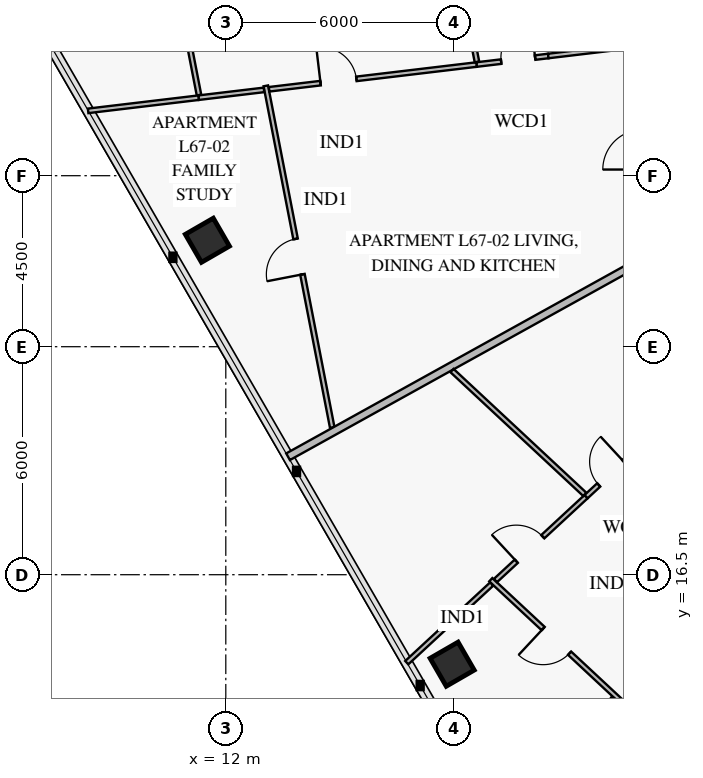
"""IFC4 building model, lengths in metres.
Left out: names, types, materials, properties, quantities, classifications, styles, units other than length and angle.
Written with IfcOpenShell. Run it as: python <this file> out.ifc"""

import sys

from ifc_helpers import new_model, si_unit, direction, frame, frame_2d, origin, origin_2d, place, context, subcontext, project, spatial, rectangle, extrude, element, fill, save


model = new_model("IFC4")
c1 = context("Model", 3, precision=1e-05, world=origin(), true_north=direction((0.0, 1.0)))
c2 = subcontext(c1, "Body", "Model", "MODEL_VIEW")
j1 = project(units=[si_unit("LENGTHUNIT", "METRE"), si_unit("PLANEANGLEUNIT", "RADIAN")], contexts=[c1])
p1 = place(None, origin())
s1 = spatial("IfcSite", under=j1, at=p1, CompositionType="ELEMENT")
p2 = place(p1, origin())
s2 = spatial("IfcBuilding", under=s1, at=p2, CompositionType="ELEMENT")
p3 = place(p2, frame((0.0, 0.0, 265.4)))
s3 = spatial("IfcBuildingStorey", under=s2, at=p3, CompositionType="ELEMENT", Elevation=265.4)
for number, where, z_axis, x_axis in (
    (1, (11.515, 25.301, 0.0), (0.0, 0.0, 1.0), (0.5, -0.866, 0.0)),
    (2, (17.956, 14.145, 0.0), (0.0, 0.0, 1.0), (0.5, -0.866, 0.0)),
):
    element("IfcColumn", number, at=place(p3, frame(where, z_axis=z_axis, x_axis=x_axis)), inside=s3, PredefinedType="COLUMN", context=c2, shape_type="SweptSolid", body=[
        extrude(rectangle(XDim=0.85, YDim=0.85, at=origin_2d()), origin(), (0.0, 0.0, 1.0), 3.55),
    ])
p4 = place(p3, frame((13.053, 29.365, 0.0), z_axis=(0.0, 0.0, 1.0), x_axis=(0.190811857209, -0.981626627159, 0.0)))
e3 = element("IfcWall", 3, at=p4, inside=s3, PredefinedType="PARTITIONING", context=c2, shape_type="SweptSolid", body=[
    extrude(rectangle(XDim=9.157, YDim=0.12, at=frame_2d((4.579, 0.0))), origin(), (0.0, 0.0, 1.0), 2.95),
])
p5 = place(p4, frame((4.104, 0.0, 0.0)))
e4 = element("IfcOpeningElement", 4, at=p5, cuts=e3, PredefinedType="OPENING", context=c2, shape_type="SweptSolid", body=[
    extrude(rectangle(XDim=0.95, YDim=2.1, at=frame_2d((0.475, 1.05))), frame((0.0, 0.072, 0.0), z_axis=(0.0, -1.0, 0.0), x_axis=(1.0, 0.0, 0.0)), (0.0, 0.0, 1.0), 0.144),
])
p6 = place(p3, frame((20.486, 30.15, 0.0), z_axis=(0.0, 0.0, 1.0), x_axis=(-0.992972480761, -0.118345479222, 0.0)))
e5 = element("IfcWall", 5, at=p6, inside=s3, PredefinedType="PARTITIONING", context=c2, shape_type="SweptSolid", body=[
    extrude(rectangle(XDim=1.902, YDim=0.12, at=frame_2d((0.951, 0.0))), origin(), (0.0, 0.0, 1.0), 3.55),
])
p7 = place(p6, frame((0.349, 0.0, 0.0)))
e6 = element("IfcOpeningElement", 6, at=p7, cuts=e5, PredefinedType="OPENING", context=c2, shape_type="SweptSolid", body=[
    extrude(rectangle(XDim=0.9, YDim=2.1, at=frame_2d((0.45, 1.05))), frame((0.0, 0.072, 0.0), z_axis=(0.0, -1.0, 0.0), x_axis=(1.0, 0.0, 0.0)), (0.0, 0.0, 1.0), 0.144),
])
p8 = place(p3, frame((18.597, 29.925, 0.0), z_axis=(0.0, 0.0, 1.0), x_axis=(-0.992967773956, -0.118384964774, 0.0)))
e7 = element("IfcWall", 7, at=p8, inside=s3, PredefinedType="PARTITIONING", context=c2, shape_type="SweptSolid", body=[
    extrude(rectangle(XDim=5.496, YDim=0.12, at=frame_2d((2.748, 0.0))), origin(), (0.0, 0.0, 1.0), 3.55),
])
p9 = place(p8, frame((3.183, 0.0, 0.0)))
e8 = element("IfcOpeningElement", 8, at=p9, cuts=e7, PredefinedType="OPENING", context=c2, shape_type="SweptSolid", body=[
    extrude(rectangle(XDim=0.95, YDim=2.1, at=frame_2d((0.475, 1.05))), frame((0.0, 0.072, 0.0), z_axis=(0.0, -1.0, 0.0), x_axis=(1.0, 0.0, 0.0)), (0.0, 0.0, 1.0), 0.144),
])
p10 = place(p3, frame((13.004, 29.258, 0.0), z_axis=(0.0, 0.0, 1.0), x_axis=(-0.992978430898, -0.118295544172, 0.0)))
e9 = element("IfcWall", 9, at=p10, inside=s3, PredefinedType="PARTITIONING", context=c2, shape_type="SweptSolid", body=[
    extrude(rectangle(XDim=1.734, YDim=0.12, at=frame_2d((0.867, 0.0))), origin(), (0.0, 0.0, 1.0), 2.93),
])
p11 = place(p3, frame((10.143, 35.047, 0.0), z_axis=(0.0, 0.0, 1.0), x_axis=(0.190784117101, -0.981632018967, 0.0)))
e10 = element("IfcWall", 10, at=p11, inside=s3, PredefinedType="PARTITIONING", context=c2, shape_type="SweptSolid", body=[
    extrude(rectangle(XDim=6.035, YDim=0.12, at=frame_2d((3.018, 0.0))), origin(), (0.0, 0.0, 1.0), 3.55),
])
p12 = place(p11, frame((2.627, 0.0, 0.0)))
e11 = element("IfcOpeningElement", 11, at=p12, cuts=e10, PredefinedType="OPENING", context=c2, shape_type="SweptSolid", body=[
    extrude(rectangle(XDim=0.95, YDim=2.1, at=frame_2d((0.475, 1.05))), frame((0.0, 0.072, 0.0), z_axis=(0.0, -1.0, 0.0), x_axis=(1.0, 0.0, 0.0)), (0.0, 0.0, 1.0), 0.144),
])
p13 = place(p3, frame((18.972, 16.368, 0.0), z_axis=(0.0, 0.0, 1.0), x_axis=(0.731359968951, -0.68199163911, 0.0)))
e12 = element("IfcWall", 12, at=p13, inside=s3, PredefinedType="PARTITIONING", context=c2, shape_type="SweptSolid", body=[
    extrude(rectangle(XDim=9.164, YDim=0.12, at=frame_2d((4.582, 0.0))), origin(), (0.0, 0.0, 1.0), 2.95),
])
p14 = place(p13, frame((1.885, 0.0, 0.0)))
e13 = element("IfcOpeningElement", 13, at=p14, cuts=e12, PredefinedType="OPENING", context=c2, shape_type="SweptSolid", body=[
    extrude(rectangle(XDim=0.95, YDim=2.1, at=frame_2d((0.475, 1.05))), frame((0.0, 0.072, 0.0), z_axis=(0.0, -1.0, 0.0), x_axis=(1.0, 0.0, 0.0)), (0.0, 0.0, 1.0), 0.144),
])
p15 = place(p13, frame((6.227, 0.0, 0.0)))
e14 = element("IfcOpeningElement", 14, at=p15, cuts=e12, PredefinedType="OPENING", context=c2, shape_type="SweptSolid", body=[
    extrude(rectangle(XDim=0.95, YDim=2.1, at=frame_2d((0.475, 1.05))), frame((0.0, 0.072, 0.0), z_axis=(0.0, -1.0, 0.0), x_axis=(1.0, 0.0, 0.0)), (0.0, 0.0, 1.0), 0.144),
])
p16 = place(p3, frame((22.625, 19.615, 0.0), z_axis=(0.0, 0.0, 1.0), x_axis=(-0.733731867306, -0.679439141424, 0.0)))
e15 = element("IfcWall", 15, at=p16, inside=s3, PredefinedType="PARTITIONING", context=c2, shape_type="SweptSolid", body=[
    extrude(rectangle(XDim=1.565, YDim=0.12, at=frame_2d((0.782, 0.0))), origin(), (0.0, 0.0, 1.0), 3.55),
])
p17 = place(p16, frame((0.207, 0.0, 0.0)))
e16 = element("IfcOpeningElement", 16, at=p17, cuts=e15, PredefinedType="OPENING", context=c2, shape_type="SweptSolid", body=[
    extrude(rectangle(XDim=0.9, YDim=2.1, at=frame_2d((0.45, 1.05))), frame((0.0, 0.072, 0.0), z_axis=(0.0, -1.0, 0.0), x_axis=(1.0, 0.0, 0.0)), (0.0, 0.0, 1.0), 0.144),
])
p18 = place(p3, frame((21.477, 18.552, 0.0), z_axis=(0.0, 0.0, 1.0), x_axis=(-0.733668997341, -0.679507028912, 0.0)))
e17 = element("IfcWall", 17, at=p18, inside=s3, PredefinedType="PARTITIONING", context=c2, shape_type="SweptSolid", body=[
    extrude(rectangle(XDim=3.245, YDim=0.12, at=frame_2d((1.623, 0.0))), origin(), (0.0, 0.0, 1.0), 3.15),
])
p19 = place(p18, frame((1.547, 0.0, 0.0)))
e18 = element("IfcOpeningElement", 18, at=p19, cuts=e17, PredefinedType="OPENING", context=c2, shape_type="SweptSolid", body=[
    extrude(rectangle(XDim=0.95, YDim=2.1, at=frame_2d((0.475, 1.05))), frame((0.0, 0.072, 0.0), z_axis=(0.0, -1.0, 0.0), x_axis=(1.0, 0.0, 0.0)), (0.0, 0.0, 1.0), 0.144),
])
p20 = place(p3, frame((18.996, 16.254, 0.0), z_axis=(0.0, 0.0, 1.0), x_axis=(-0.733732538896, -0.679438416168, 0.0)))
e19 = element("IfcWall", 19, at=p20, inside=s3, PredefinedType="PARTITIONING", context=c2, shape_type="SweptSolid", body=[
    extrude(rectangle(XDim=3.044, YDim=0.12, at=frame_2d((1.522, 0.0))), origin(), (0.0, 0.0, 1.0), 2.93),
])
p21 = place(p3, frame((23.015, 30.452, 0.0), z_axis=(0.0, 0.0, 1.0), x_axis=(-0.992958240304, -0.118464902029, 0.0)))
e20 = element("IfcWall", 20, at=p21, inside=s3, PredefinedType="PARTITIONING", context=c2, shape_type="SweptSolid", body=[
    extrude(rectangle(XDim=2.547, YDim=0.12, at=frame_2d((1.273, 0.0))), origin(), (0.0, 0.0, 1.0), 3.55),
])
p22 = place(p3, frame((11.283, 29.053, 0.0), z_axis=(0.0, 0.0, 1.0), x_axis=(-0.992964231091, -0.118414677193, 0.0)))
e21 = element("IfcWall", 21, at=p22, inside=s3, PredefinedType="PARTITIONING", context=c2, shape_type="SweptSolid", body=[
    extrude(rectangle(XDim=2.926, YDim=0.12, at=frame_2d((1.463, 0.0))), origin(), (0.0, 0.0, 1.0), 3.55),
])
p23 = place(p3, frame((17.806, 34.125, 0.0), z_axis=(0.0, 0.0, 1.0), x_axis=(0.190824624048, -0.981624145413, 0.0)))
e22 = element("IfcWall", 22, at=p23, inside=s3, PredefinedType="PARTITIONING", context=c2, shape_type="SweptSolid", body=[
    extrude(rectangle(XDim=4.208, YDim=0.12, at=frame_2d((2.104, 0.0))), origin(), (0.0, 0.0, 1.0), 3.55),
])
p24 = place(p3, frame((23.01, 24.8, 0.0), z_axis=(0.0, 0.0, 1.0), x_axis=(-0.874612572959, -0.484822490426, 0.0)))
e23 = element("IfcWall", 23, at=p24, inside=s3, PredefinedType="PARTITIONING", context=c2, shape_type="SweptSolid", body=[
    extrude(rectangle(XDim=10.715, YDim=0.2, at=frame_2d((5.358, 0.0))), origin(), (0.0, 0.0, 1.0), 2.93),
])
p25 = place(p3, frame((22.208, 13.258, 0.0), z_axis=(0.0, 0.0, 1.0), x_axis=(-0.592681807332, -0.80543669848, 0.0)))
e24 = element("IfcWall", 24, at=p25, inside=s3, PredefinedType="PARTITIONING", context=c2, shape_type="SweptSolid", body=[
    extrude(rectangle(XDim=4.67, YDim=0.12, at=frame_2d((2.335, 0.0))), origin(), (0.0, 0.0, 1.0), 2.93),
])
p26 = place(p3, frame((17.952, 21.872, 0.0), z_axis=(0.0, 0.0, 1.0), x_axis=(0.731364558904, -0.681986716864, 0.0)))
e25 = element("IfcWall", 25, at=p26, inside=s3, PredefinedType="PARTITIONING", context=c2, shape_type="SweptSolid", body=[
    extrude(rectangle(XDim=4.776, YDim=0.12, at=frame_2d((2.388, 0.0))), origin(), (0.0, 0.0, 1.0), 3.15),
])
p27 = place(p5, frame((0.95, 0.0, 0.0), z_axis=(0.0, 0.0, 1.0), x_axis=(-1.0, 0.0, 0.0)))
e26 = element("IfcDoor", 26, at=p27, inside=s3, OperationType="SINGLE_SWING_LEFT", PredefinedType="DOOR", context=c2, shape_type="SweptSolid", body=[
    extrude(rectangle(XDim=0.95, YDim=2.1, at=frame_2d((0.475, 1.05))), frame((0.0, 0.025, 0.0), z_axis=(0.0, -1.0, 0.0), x_axis=(1.0, 0.0, 0.0)), (0.0, 0.0, 1.0), 0.05),
])
fill(e4, e26)
p28 = place(p7, frame((0.9, 0.0, 0.0), z_axis=(0.0, 0.0, 1.0), x_axis=(-1.0, 0.0, 0.0)))
e27 = element("IfcDoor", 27, at=p28, inside=s3, OperationType="SINGLE_SWING_RIGHT", PredefinedType="DOOR", context=c2, shape_type="SweptSolid", body=[
    extrude(rectangle(XDim=0.9, YDim=2.1, at=frame_2d((0.45, 1.05))), frame((0.0, 0.025, 0.0), z_axis=(0.0, -1.0, 0.0), x_axis=(1.0, 0.0, 0.0)), (0.0, 0.0, 1.0), 0.05),
])
fill(e6, e27)
p29 = place(p9, frame((0.95, 0.0, 0.0), z_axis=(0.0, 0.0, 1.0), x_axis=(-1.0, 0.0, 0.0)))
e28 = element("IfcDoor", 28, at=p29, inside=s3, OperationType="SINGLE_SWING_LEFT", PredefinedType="DOOR", context=c2, shape_type="SweptSolid", body=[
    extrude(rectangle(XDim=0.95, YDim=2.1, at=frame_2d((0.475, 1.05))), frame((0.0, 0.025, 0.0), z_axis=(0.0, -1.0, 0.0), x_axis=(1.0, 0.0, 0.0)), (0.0, 0.0, 1.0), 0.05),
])
fill(e8, e28)
p30 = place(p14, frame((0.95, 0.0, 0.0), z_axis=(0.0, 0.0, 1.0), x_axis=(-1.0, 0.0, 0.0)))
e29 = element("IfcDoor", 29, at=p30, inside=s3, OperationType="SINGLE_SWING_RIGHT", PredefinedType="DOOR", context=c2, shape_type="SweptSolid", body=[
    extrude(rectangle(XDim=0.95, YDim=2.1, at=frame_2d((0.475, 1.05))), frame((0.0, 0.025, 0.0), z_axis=(0.0, -1.0, 0.0), x_axis=(1.0, 0.0, 0.0)), (0.0, 0.0, 1.0), 0.05),
])
fill(e13, e29)
p31 = place(p17, frame((0.9, 0.0, 0.0), z_axis=(0.0, 0.0, 1.0), x_axis=(-1.0, 0.0, 0.0)))
e30 = element("IfcDoor", 30, at=p31, inside=s3, OperationType="SINGLE_SWING_RIGHT", PredefinedType="DOOR", context=c2, shape_type="SweptSolid", body=[
    extrude(rectangle(XDim=0.9, YDim=2.1, at=frame_2d((0.45, 1.05))), frame((0.0, 0.025, 0.0), z_axis=(0.0, -1.0, 0.0), x_axis=(1.0, 0.0, 0.0)), (0.0, 0.0, 1.0), 0.05),
])
fill(e16, e30)
p32 = place(p19, frame((0.95, 0.0, 0.0), z_axis=(0.0, 0.0, 1.0), x_axis=(-1.0, 0.0, 0.0)))
e31 = element("IfcDoor", 31, at=p32, inside=s3, OperationType="SINGLE_SWING_LEFT", PredefinedType="DOOR", context=c2, shape_type="SweptSolid", body=[
    extrude(rectangle(XDim=0.95, YDim=2.1, at=frame_2d((0.475, 1.05))), frame((0.0, 0.025, 0.0), z_axis=(0.0, -1.0, 0.0), x_axis=(1.0, 0.0, 0.0)), (0.0, 0.0, 1.0), 0.05),
])
fill(e18, e31)
save(model, sys.argv[1])
